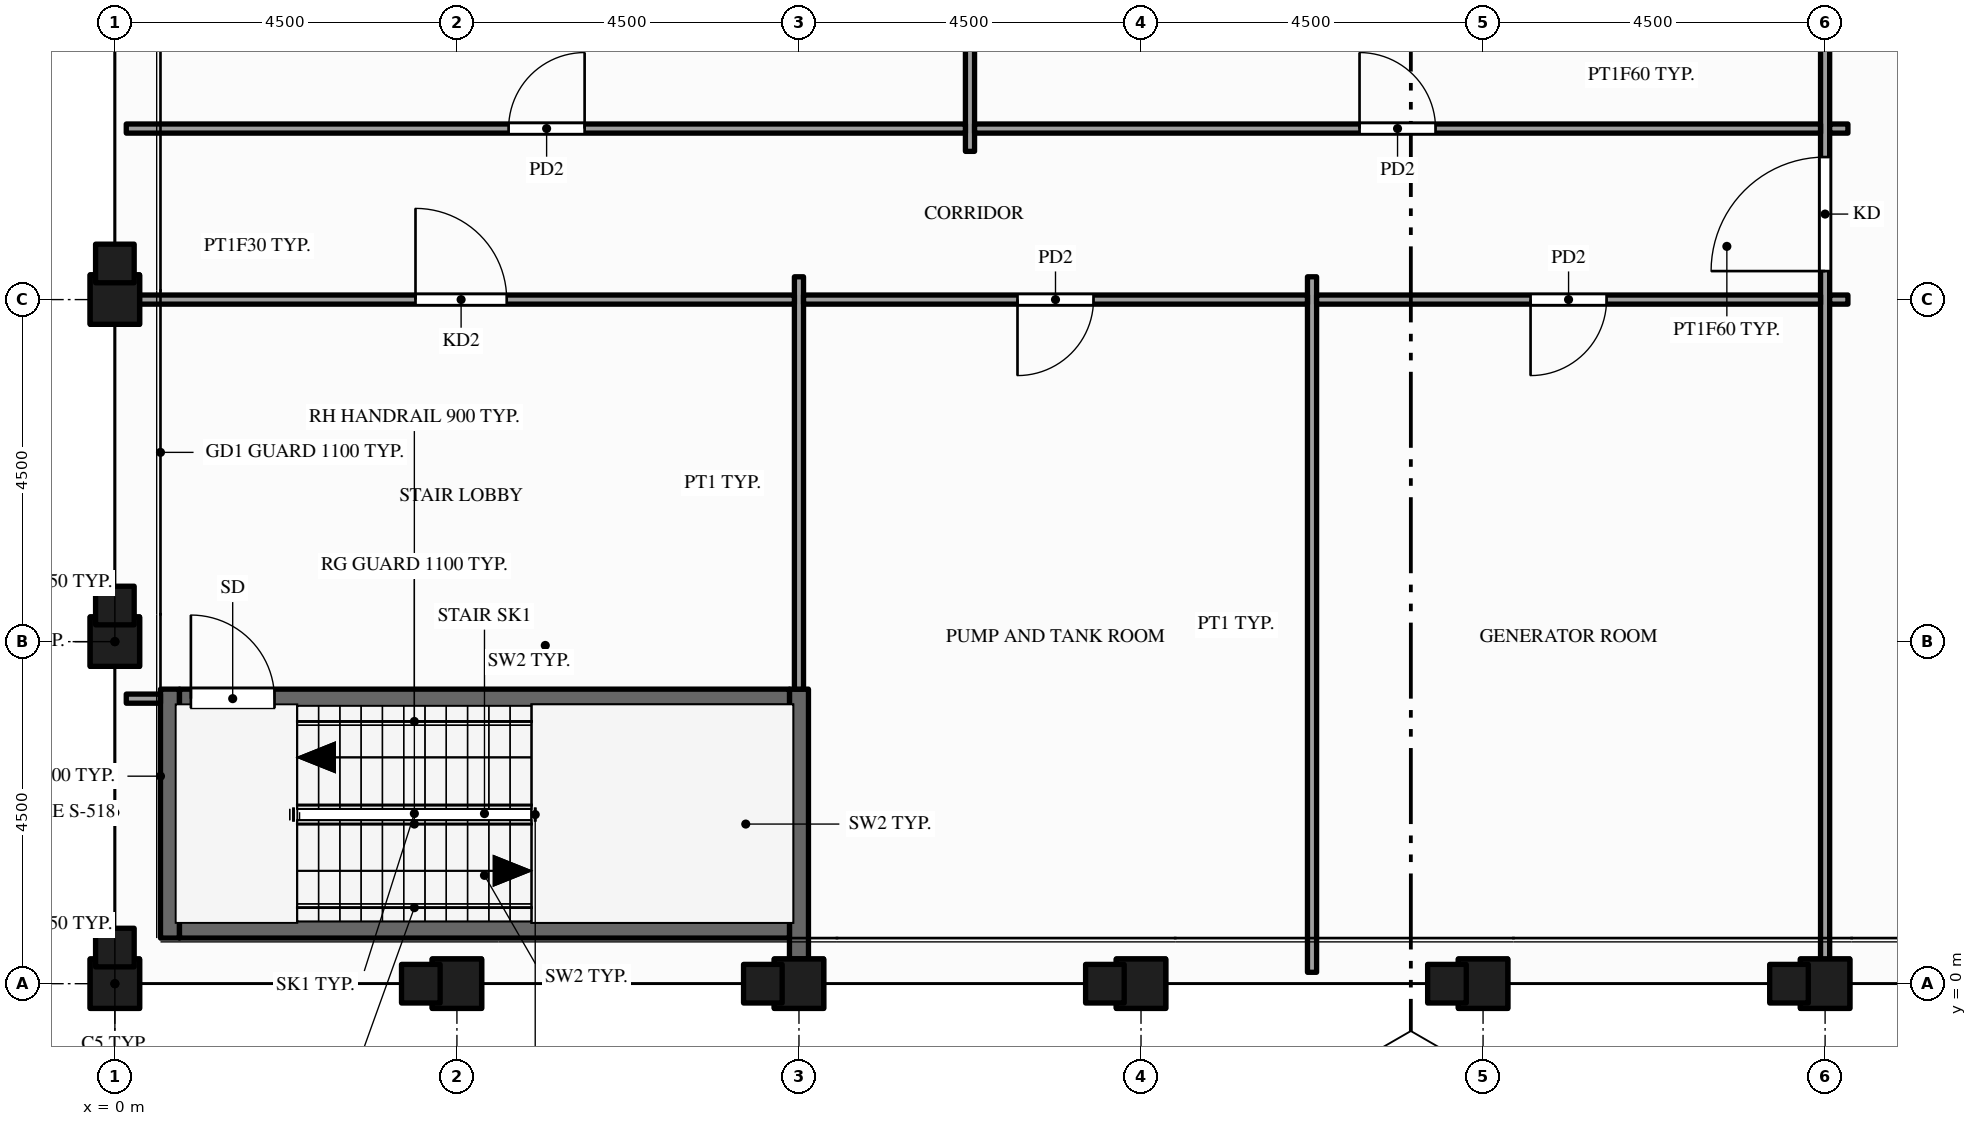
"""IFC4 building model, lengths in metres.
Left out: names, types, materials, properties, quantities, classifications, styles, units other than length and angle.
Written with IfcOpenShell. Run it as: python <this file> out.ifc"""

import sys

from ifc_helpers import new_model, si_unit, direction, frame, frame_2d, origin, origin_2d, place, context, subcontext, project, spatial, rectangle, hollow_rectangle, extrude, element, fill, save


model = new_model("IFC4")
c1 = context("Model", 3, precision=1e-05, world=origin(), true_north=direction((0.0, 1.0)))
c2 = subcontext(c1, "Body", "Model", "MODEL_VIEW")
j1 = project(units=[si_unit("LENGTHUNIT", "METRE"), si_unit("PLANEANGLEUNIT", "RADIAN")], contexts=[c1])
p1 = place(None, origin())
s1 = spatial("IfcSite", under=j1, at=p1, CompositionType="ELEMENT")
p2 = place(p1, origin())
s2 = spatial("IfcBuilding", under=s1, at=p2, CompositionType="ELEMENT")
p3 = place(p2, frame((0.0, 0.0, 297.0)))
s3 = spatial("IfcBuildingStorey", under=s2, at=p3, CompositionType="ELEMENT", Elevation=297.0)
p4 = place(p3, frame((0.0, 0.0, -0.25), z_axis=(0.0, 0.0, 1.0), x_axis=(1.0, 0.0, 0.0)))
e1 = element("IfcColumn", 1, at=p4, inside=s3, PredefinedType="COLUMN", context=c2, shape_type="SweptSolid", body=[
    extrude(hollow_rectangle(XDim=0.65, YDim=0.65, WallThickness=0.032, at=origin_2d()), origin(), (0.0, 0.0, 1.0), 6.6),
])
p5 = place(p3, frame((0.0, 0.0, 6.35), z_axis=(0.0, 0.0, 1.0), x_axis=(1.0, 0.0, 0.0)))
e2 = element("IfcColumn", 2, at=p5, inside=s3, PredefinedType="COLUMN", context=c2, shape_type="SweptSolid", body=[
    extrude(rectangle(XDim=0.65, YDim=0.65, at=origin_2d()), origin(), (0.0, 0.0, 1.0), 1.5),
])
p6 = place(p3, frame((0.0, 4.5, -0.25), z_axis=(0.0, 0.0, 1.0), x_axis=(1.0, 0.0, 0.0)))
e3 = element("IfcColumn", 3, at=p6, inside=s3, PredefinedType="COLUMN", context=c2, shape_type="SweptSolid", body=[
    extrude(hollow_rectangle(XDim=0.65, YDim=0.65, WallThickness=0.032, at=origin_2d()), origin(), (0.0, 0.0, 1.0), 6.6),
])
p7 = place(p3, frame((0.0, 4.5, 6.35), z_axis=(0.0, 0.0, 1.0), x_axis=(1.0, 0.0, 0.0)))
e4 = element("IfcColumn", 4, at=p7, inside=s3, PredefinedType="COLUMN", context=c2, shape_type="SweptSolid", body=[
    extrude(rectangle(XDim=0.65, YDim=0.65, at=origin_2d()), origin(), (0.0, 0.0, 1.0), 1.5),
])
p8 = place(p3, frame((0.0, 9.0, -0.25), z_axis=(0.0, 0.0, 1.0), x_axis=(1.0, 0.0, 0.0)))
e5 = element("IfcColumn", 5, at=p8, inside=s3, PredefinedType="COLUMN", context=c2, shape_type="SweptSolid", body=[
    extrude(hollow_rectangle(XDim=0.65, YDim=0.65, WallThickness=0.032, at=origin_2d()), origin(), (0.0, 0.0, 1.0), 6.6),
])
p9 = place(p3, frame((0.0, 9.0, 6.35), z_axis=(0.0, 0.0, 1.0), x_axis=(1.0, 0.0, 0.0)))
e6 = element("IfcColumn", 6, at=p9, inside=s3, PredefinedType="COLUMN", context=c2, shape_type="SweptSolid", body=[
    extrude(rectangle(XDim=0.65, YDim=0.65, at=origin_2d()), origin(), (0.0, 0.0, 1.0), 1.5),
])
p10 = place(p3, frame((4.5, 0.0, -0.25), z_axis=(0.0, 0.0, 1.0), x_axis=(1.0, 0.0, 0.0)))
e7 = element("IfcColumn", 7, at=p10, inside=s3, PredefinedType="COLUMN", context=c2, shape_type="SweptSolid", body=[
    extrude(hollow_rectangle(XDim=0.65, YDim=0.65, WallThickness=0.032, at=origin_2d()), origin(), (0.0, 0.0, 1.0), 6.6),
])
p11 = place(p3, frame((4.5, 0.0, 6.35), z_axis=(0.0, 0.0, 1.0), x_axis=(1.0, 0.0, 0.0)))
e8 = element("IfcColumn", 8, at=p11, inside=s3, PredefinedType="COLUMN", context=c2, shape_type="SweptSolid", body=[
    extrude(rectangle(XDim=0.65, YDim=0.65, at=origin_2d()), origin(), (0.0, 0.0, 1.0), 1.5),
])
p12 = place(p3, frame((9.0, 0.0, -0.25), z_axis=(0.0, 0.0, 1.0), x_axis=(1.0, 0.0, 0.0)))
e9 = element("IfcColumn", 9, at=p12, inside=s3, PredefinedType="COLUMN", context=c2, shape_type="SweptSolid", body=[
    extrude(hollow_rectangle(XDim=0.65, YDim=0.65, WallThickness=0.032, at=origin_2d()), origin(), (0.0, 0.0, 1.0), 6.6),
])
p13 = place(p3, frame((9.0, 0.0, 6.35), z_axis=(0.0, 0.0, 1.0), x_axis=(1.0, 0.0, 0.0)))
e10 = element("IfcColumn", 10, at=p13, inside=s3, PredefinedType="COLUMN", context=c2, shape_type="SweptSolid", body=[
    extrude(rectangle(XDim=0.65, YDim=0.65, at=origin_2d()), origin(), (0.0, 0.0, 1.0), 1.5),
])
p14 = place(p3, frame((13.5, 0.0, -0.25), z_axis=(0.0, 0.0, 1.0), x_axis=(1.0, 0.0, 0.0)))
e11 = element("IfcColumn", 11, at=p14, inside=s3, PredefinedType="COLUMN", context=c2, shape_type="SweptSolid", body=[
    extrude(hollow_rectangle(XDim=0.65, YDim=0.65, WallThickness=0.032, at=origin_2d()), origin(), (0.0, 0.0, 1.0), 6.6),
])
p15 = place(p3, frame((13.5, 0.0, 6.35), z_axis=(0.0, 0.0, 1.0), x_axis=(1.0, 0.0, 0.0)))
e12 = element("IfcColumn", 12, at=p15, inside=s3, PredefinedType="COLUMN", context=c2, shape_type="SweptSolid", body=[
    extrude(rectangle(XDim=0.65, YDim=0.65, at=origin_2d()), origin(), (0.0, 0.0, 1.0), 1.5),
])
p16 = place(p3, frame((18.0, 0.0, -0.25), z_axis=(0.0, 0.0, 1.0), x_axis=(1.0, 0.0, 0.0)))
e13 = element("IfcColumn", 13, at=p16, inside=s3, PredefinedType="COLUMN", context=c2, shape_type="SweptSolid", body=[
    extrude(hollow_rectangle(XDim=0.65, YDim=0.65, WallThickness=0.032, at=origin_2d()), origin(), (0.0, 0.0, 1.0), 6.6),
])
p17 = place(p3, frame((18.0, 0.0, 6.35), z_axis=(0.0, 0.0, 1.0), x_axis=(1.0, 0.0, 0.0)))
e14 = element("IfcColumn", 14, at=p17, inside=s3, PredefinedType="COLUMN", context=c2, shape_type="SweptSolid", body=[
    extrude(rectangle(XDim=0.65, YDim=0.65, at=origin_2d()), origin(), (0.0, 0.0, 1.0), 1.5),
])
p18 = place(p3, frame((22.5, 0.0, -0.25), z_axis=(0.0, 0.0, 1.0), x_axis=(1.0, 0.0, 0.0)))
e15 = element("IfcColumn", 15, at=p18, inside=s3, PredefinedType="COLUMN", context=c2, shape_type="SweptSolid", body=[
    extrude(hollow_rectangle(XDim=0.65, YDim=0.65, WallThickness=0.032, at=origin_2d()), origin(), (0.0, 0.0, 1.0), 6.6),
])
p19 = place(p3, frame((22.5, 0.0, 6.35), z_axis=(0.0, 0.0, 1.0), x_axis=(1.0, 0.0, 0.0)))
e16 = element("IfcColumn", 16, at=p19, inside=s3, PredefinedType="COLUMN", context=c2, shape_type="SweptSolid", body=[
    extrude(rectangle(XDim=0.65, YDim=0.65, at=origin_2d()), origin(), (0.0, 0.0, 1.0), 1.5),
])
p20 = place(p3, frame((0.725, 0.6, 0.0), z_axis=(0.0, 0.0, 1.0), x_axis=(0.0, 1.0, 0.0)))
e17 = element("IfcWall", 17, at=p20, inside=s3, PredefinedType="SHEAR", context=c2, shape_type="SweptSolid", body=[
    extrude(rectangle(XDim=3.275, YDim=0.25, at=frame_2d((1.637, 0.0))), origin(), (0.0, 0.0, 1.0), 7.85),
])
p21 = place(p3, frame((9.0, 0.325, 0.0), z_axis=(0.0, 0.0, 1.0), x_axis=(0.0, 1.0, 0.0)))
e18 = element("IfcWall", 18, at=p21, inside=s3, PredefinedType="SHEAR", context=c2, shape_type="SweptSolid", body=[
    extrude(rectangle(XDim=3.55, YDim=0.25, at=frame_2d((1.775, 0.0))), origin(), (0.0, 0.0, 1.0), 7.85),
])
p22 = place(p3, frame((9.0, 3.875, 0.0), z_axis=(0.0, 0.0, 1.0), x_axis=(0.0, 1.0, 0.0)))
e19 = element("IfcWall", 19, at=p22, inside=s3, PredefinedType="PARTITIONING", context=c2, shape_type="SweptSolid", body=[
    extrude(rectangle(XDim=5.425, YDim=0.12, at=frame_2d((2.712, 0.0))), origin(), (0.0, 0.0, 1.0), 6.859),
])
p23 = place(p3, frame((11.25, 10.95, 0.0), z_axis=(0.0, 0.0, 1.0), x_axis=(0.0, 1.0, 0.0)))
e20 = element("IfcWall", 20, at=p23, inside=s3, PredefinedType="PARTITIONING", context=c2, shape_type="SweptSolid", body=[
    extrude(rectangle(XDim=11.4, YDim=0.12, at=frame_2d((5.7, 0.0))), origin(), (0.0, 0.0, 1.0), 6.859),
])
p24 = place(p3, frame((15.75, 0.15, 0.0), z_axis=(0.0, 0.0, 1.0), x_axis=(0.0, 1.0, 0.0)))
e21 = element("IfcWall", 21, at=p24, inside=s3, PredefinedType="PARTITIONING", context=c2, shape_type="SweptSolid", body=[
    extrude(rectangle(XDim=9.15, YDim=0.12, at=frame_2d((4.575, 0.0))), origin(), (0.0, 0.0, 1.0), 6.859),
])
p25 = place(p3, frame((22.5, 0.15, 0.0), z_axis=(0.0, 0.0, 1.0), x_axis=(0.0, 1.0, 0.0)))
e22 = element("IfcWall", 22, at=p25, inside=s3, PredefinedType="PARTITIONING", context=c2, shape_type="SweptSolid", body=[
    extrude(rectangle(XDim=22.2, YDim=0.12, at=frame_2d((11.1, 0.0))), origin(), (0.0, 0.0, 1.0), 6.859),
])
p26 = place(p25, frame((9.225, 0.0, 0.0)))
e23 = element("IfcOpeningElement", 23, at=p26, cuts=e22, PredefinedType="OPENING", context=c2, shape_type="SweptSolid", body=[
    extrude(rectangle(XDim=1.5, YDim=2.1, at=frame_2d((0.75, 1.05))), frame((0.0, 0.07, 0.0), z_axis=(0.0, -1.0, 0.0), x_axis=(1.0, 0.0, 0.0)), (0.0, 0.0, 1.0), 0.14),
])
p27 = place(p3, frame((0.85, 0.725, 0.0), z_axis=(0.0, 0.0, 1.0), x_axis=(1.0, 0.0, 0.0)))
e24 = element("IfcWall", 24, at=p27, inside=s3, PredefinedType="SHEAR", context=c2, shape_type="SweptSolid", body=[
    extrude(rectangle(XDim=8.025, YDim=0.25, at=frame_2d((4.012, 0.0))), origin(), (0.0, 0.0, 1.0), 7.85),
])
p28 = place(p3, frame((0.15, 3.75, 0.0), z_axis=(0.0, 0.0, 1.0), x_axis=(1.0, 0.0, 0.0)))
e25 = element("IfcWall", 25, at=p28, inside=s3, PredefinedType="PARTITIONING", context=c2, shape_type="SweptSolid", body=[
    extrude(rectangle(XDim=0.45, YDim=0.12, at=frame_2d((0.225, 0.0))), origin(), (0.0, 0.0, 1.0), 7.85),
])
p29 = place(p3, frame((0.85, 3.75, 0.0), z_axis=(0.0, 0.0, 1.0), x_axis=(1.0, 0.0, 0.0)))
e26 = element("IfcWall", 26, at=p29, inside=s3, PredefinedType="SHEAR", context=c2, shape_type="SweptSolid", body=[
    extrude(rectangle(XDim=8.025, YDim=0.25, at=frame_2d((4.012, 0.0))), origin(), (0.0, 0.0, 1.0), 7.85),
])
p30 = place(p29, frame((0.15, 0.0, 0.0)))
e27 = element("IfcOpeningElement", 27, at=p30, cuts=e26, PredefinedType="OPENING", context=c2, shape_type="SweptSolid", body=[
    extrude(rectangle(XDim=1.1, YDim=2.1, at=frame_2d((0.55, 1.05))), frame((0.0, 0.135, 0.0), z_axis=(0.0, -1.0, 0.0), x_axis=(1.0, 0.0, 0.0)), (0.0, 0.0, 1.0), 0.27),
])
p31 = place(p3, frame((0.15, 9.0, 0.0), z_axis=(0.0, 0.0, 1.0), x_axis=(1.0, 0.0, 0.0)))
e28 = element("IfcWall", 28, at=p31, inside=s3, PredefinedType="PARTITIONING", context=c2, shape_type="SweptSolid", body=[
    extrude(rectangle(XDim=8.79, YDim=0.12, at=frame_2d((4.395, 0.0))), origin(), (0.0, 0.0, 1.0), 6.859),
])
p32 = place(p31, frame((3.805, 0.0, 0.0)))
e29 = element("IfcOpeningElement", 29, at=p32, cuts=e28, PredefinedType="OPENING", context=c2, shape_type="SweptSolid", body=[
    extrude(rectangle(XDim=1.2, YDim=2.1, at=frame_2d((0.6, 1.05))), frame((0.0, 0.07, 0.0), z_axis=(0.0, -1.0, 0.0), x_axis=(1.0, 0.0, 0.0)), (0.0, 0.0, 1.0), 0.14),
])
p33 = place(p3, frame((9.06, 9.0, 0.0), z_axis=(0.0, 0.0, 1.0), x_axis=(1.0, 0.0, 0.0)))
e30 = element("IfcWall", 30, at=p33, inside=s3, PredefinedType="PARTITIONING", context=c2, shape_type="SweptSolid", body=[
    extrude(rectangle(XDim=6.63, YDim=0.12, at=frame_2d((3.315, 0.0))), origin(), (0.0, 0.0, 1.0), 6.859),
])
p34 = place(p33, frame((2.815, 0.0, 0.0)))
e31 = element("IfcOpeningElement", 31, at=p34, cuts=e30, PredefinedType="OPENING", context=c2, shape_type="SweptSolid", body=[
    extrude(rectangle(XDim=1.0, YDim=2.1, at=frame_2d((0.5, 1.05))), frame((0.0, 0.07, 0.0), z_axis=(0.0, -1.0, 0.0), x_axis=(1.0, 0.0, 0.0)), (0.0, 0.0, 1.0), 0.14),
])
p35 = place(p3, frame((15.81, 9.0, 0.0), z_axis=(0.0, 0.0, 1.0), x_axis=(1.0, 0.0, 0.0)))
e32 = element("IfcWall", 32, at=p35, inside=s3, PredefinedType="PARTITIONING", context=c2, shape_type="SweptSolid", body=[
    extrude(rectangle(XDim=6.63, YDim=0.12, at=frame_2d((3.315, 0.0))), origin(), (0.0, 0.0, 1.0), 6.859),
])
p36 = place(p35, frame((2.815, 0.0, 0.0)))
e33 = element("IfcOpeningElement", 33, at=p36, cuts=e32, PredefinedType="OPENING", context=c2, shape_type="SweptSolid", body=[
    extrude(rectangle(XDim=1.0, YDim=2.1, at=frame_2d((0.5, 1.05))), frame((0.0, 0.07, 0.0), z_axis=(0.0, -1.0, 0.0), x_axis=(1.0, 0.0, 0.0)), (0.0, 0.0, 1.0), 0.14),
])
p37 = place(p3, frame((22.56, 9.0, 0.0), z_axis=(0.0, 0.0, 1.0), x_axis=(1.0, 0.0, 0.0)))
e34 = element("IfcWall", 34, at=p37, inside=s3, PredefinedType="PARTITIONING", context=c2, shape_type="SweptSolid", body=[
    extrude(rectangle(XDim=0.24, YDim=0.12, at=frame_2d((0.12, 0.0))), origin(), (0.0, 0.0, 1.0), 6.859),
])
p38 = place(p3, frame((0.15, 11.25, 0.0), z_axis=(0.0, 0.0, 1.0), x_axis=(1.0, 0.0, 0.0)))
e35 = element("IfcWall", 35, at=p38, inside=s3, PredefinedType="PARTITIONING", context=c2, shape_type="SweptSolid", body=[
    extrude(rectangle(XDim=11.04, YDim=0.12, at=frame_2d((5.52, 0.0))), origin(), (0.0, 0.0, 1.0), 6.859),
])
p39 = place(p38, frame((5.03, 0.0, 0.0)))
e36 = element("IfcOpeningElement", 36, at=p39, cuts=e35, PredefinedType="OPENING", context=c2, shape_type="SweptSolid", body=[
    extrude(rectangle(XDim=1.0, YDim=2.1, at=frame_2d((0.5, 1.05))), frame((0.0, 0.07, 0.0), z_axis=(0.0, -1.0, 0.0), x_axis=(1.0, 0.0, 0.0)), (0.0, 0.0, 1.0), 0.14),
])
p40 = place(p3, frame((11.31, 11.25, 0.0), z_axis=(0.0, 0.0, 1.0), x_axis=(1.0, 0.0, 0.0)))
e37 = element("IfcWall", 37, at=p40, inside=s3, PredefinedType="PARTITIONING", context=c2, shape_type="SweptSolid", body=[
    extrude(rectangle(XDim=11.13, YDim=0.12, at=frame_2d((5.565, 0.0))), origin(), (0.0, 0.0, 1.0), 6.859),
])
p41 = place(p40, frame((5.065, 0.0, 0.0)))
e38 = element("IfcOpeningElement", 38, at=p41, cuts=e37, PredefinedType="OPENING", context=c2, shape_type="SweptSolid", body=[
    extrude(rectangle(XDim=1.0, YDim=2.1, at=frame_2d((0.5, 1.05))), frame((0.0, 0.07, 0.0), z_axis=(0.0, -1.0, 0.0), x_axis=(1.0, 0.0, 0.0)), (0.0, 0.0, 1.0), 0.14),
])
p42 = place(p3, frame((22.56, 11.25, 0.0), z_axis=(0.0, 0.0, 1.0), x_axis=(1.0, 0.0, 0.0)))
e39 = element("IfcWall", 39, at=p42, inside=s3, PredefinedType="PARTITIONING", context=c2, shape_type="SweptSolid", body=[
    extrude(rectangle(XDim=0.24, YDim=0.12, at=frame_2d((0.12, 0.0))), origin(), (0.0, 0.0, 1.0), 6.859),
])
p43 = place(p30, origin())
e40 = element("IfcDoor", 40, at=p43, inside=s3, OperationType="SINGLE_SWING_LEFT", PredefinedType="DOOR", context=c2, shape_type="SweptSolid", body=[
    extrude(rectangle(XDim=1.1, YDim=2.1, at=frame_2d((0.55, 1.05))), frame((0.0, 0.025, 0.0), z_axis=(0.0, -1.0, 0.0), x_axis=(1.0, 0.0, 0.0)), (0.0, 0.0, 1.0), 0.05),
])
fill(e27, e40)
p44 = place(p32, origin())
e41 = element("IfcDoor", 41, at=p44, inside=s3, OperationType="SINGLE_SWING_LEFT", PredefinedType="DOOR", context=c2, shape_type="SweptSolid", body=[
    extrude(rectangle(XDim=1.2, YDim=2.1, at=frame_2d((0.6, 1.05))), frame((0.0, 0.025, 0.0), z_axis=(0.0, -1.0, 0.0), x_axis=(1.0, 0.0, 0.0)), (0.0, 0.0, 1.0), 0.05),
])
fill(e29, e41)
p45 = place(p34, origin())
e42 = element("IfcDoor", 42, at=p45, inside=s3, OperationType="SINGLE_SWING_LEFT", PredefinedType="DOOR", context=c2, shape_type="SweptSolid", body=[
    extrude(rectangle(XDim=1.0, YDim=2.1, at=frame_2d((0.5, 1.05))), frame((0.0, 0.025, 0.0), z_axis=(0.0, -1.0, 0.0), x_axis=(1.0, 0.0, 0.0)), (0.0, 0.0, 1.0), 0.05),
])
fill(e31, e42)
p46 = place(p36, origin())
e43 = element("IfcDoor", 43, at=p46, inside=s3, OperationType="SINGLE_SWING_LEFT", PredefinedType="DOOR", context=c2, shape_type="SweptSolid", body=[
    extrude(rectangle(XDim=1.0, YDim=2.1, at=frame_2d((0.5, 1.05))), frame((0.0, 0.025, 0.0), z_axis=(0.0, -1.0, 0.0), x_axis=(1.0, 0.0, 0.0)), (0.0, 0.0, 1.0), 0.05),
])
fill(e33, e43)
p47 = place(p39, origin())
e44 = element("IfcDoor", 44, at=p47, inside=s3, OperationType="SINGLE_SWING_RIGHT", PredefinedType="DOOR", context=c2, shape_type="SweptSolid", body=[
    extrude(rectangle(XDim=1.0, YDim=2.1, at=frame_2d((0.5, 1.05))), frame((0.0, 0.025, 0.0), z_axis=(0.0, -1.0, 0.0), x_axis=(1.0, 0.0, 0.0)), (0.0, 0.0, 1.0), 0.05),
])
fill(e36, e44)
p48 = place(p41, origin())
e45 = element("IfcDoor", 45, at=p48, inside=s3, OperationType="SINGLE_SWING_LEFT", PredefinedType="DOOR", context=c2, shape_type="SweptSolid", body=[
    extrude(rectangle(XDim=1.0, YDim=2.1, at=frame_2d((0.5, 1.05))), frame((0.0, 0.025, 0.0), z_axis=(0.0, -1.0, 0.0), x_axis=(1.0, 0.0, 0.0)), (0.0, 0.0, 1.0), 0.05),
])
fill(e38, e45)
p49 = place(p26, origin())
e46 = element("IfcDoor", 46, at=p49, inside=s3, OperationType="SINGLE_SWING_LEFT", PredefinedType="DOOR", context=c2, shape_type="SweptSolid", body=[
    extrude(rectangle(XDim=1.5, YDim=2.1, at=frame_2d((0.75, 1.05))), frame((0.0, 0.025, 0.0), z_axis=(0.0, -1.0, 0.0), x_axis=(1.0, 0.0, 0.0)), (0.0, 0.0, 1.0), 0.05),
])
fill(e23, e46)
save(model, sys.argv[1])
